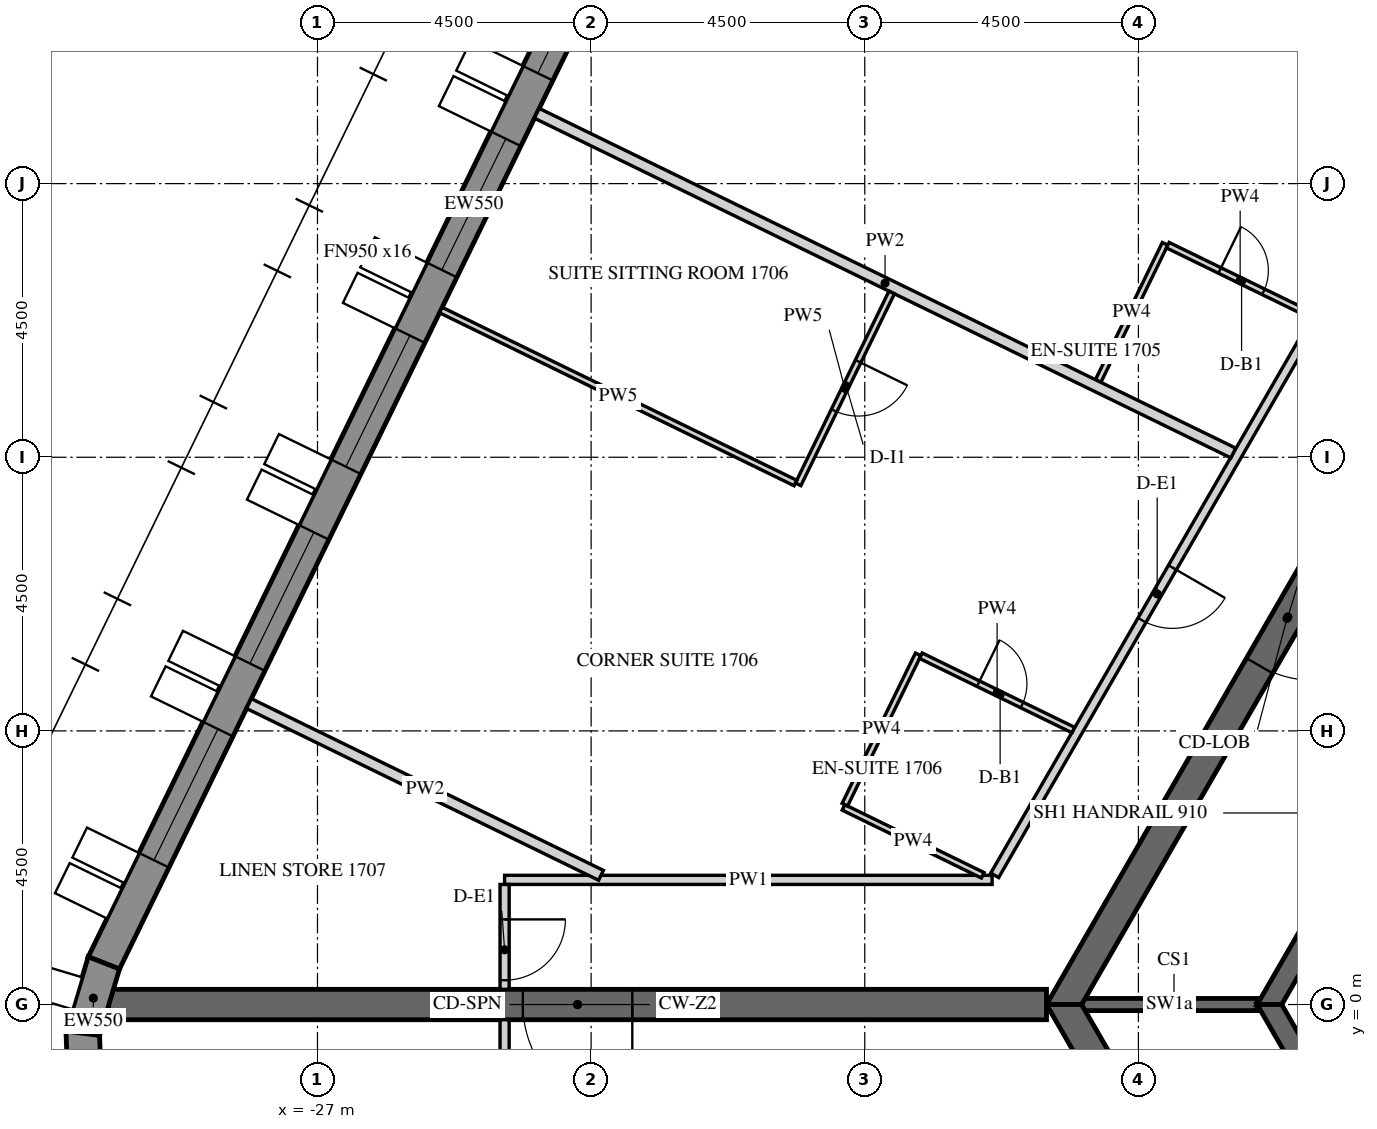
"""IFC4 building model, lengths in metres.
Left out: names, types, materials, properties, quantities, classifications, styles, units other than length and angle.
Written with IfcOpenShell. Run it as: python <this file> out.ifc"""

import sys

from ifc_helpers import new_model, si_unit, direction, frame, frame_2d, origin, place, context, subcontext, project, spatial, polyline, rectangle, outline, extrude, element, fill, save


model = new_model("IFC4")
c1 = context("Model", 3, precision=1e-05, world=origin(), true_north=direction((0.0, 1.0)))
c2 = subcontext(c1, "Body", "Model", "MODEL_VIEW")
j1 = project(units=[si_unit("LENGTHUNIT", "METRE"), si_unit("PLANEANGLEUNIT", "RADIAN")], contexts=[c1])
p1 = place(None, origin())
s1 = spatial("IfcSite", under=j1, at=p1, CompositionType="ELEMENT")
p2 = place(p1, origin())
s2 = spatial("IfcBuilding", under=s1, at=p2, CompositionType="ELEMENT")
p3 = place(p2, frame((0.0, 0.0, 215.1)))
s3 = spatial("IfcBuildingStorey", under=s2, at=p3, CompositionType="ELEMENT", Elevation=215.1)
p4 = place(p3, frame((-18.345, 25.633, -0.15), z_axis=(0.0, 0.0, 1.0), x_axis=(-0.43837181828, -0.898793718791, 0.0)))
e1 = element("IfcWall", 1, at=p4, inside=s3, PredefinedType="SOLIDWALL", context=c2, shape_type="SweptSolid", body=[
    extrude(outline(polyline([(-0.026, -0.275), (27.78, -0.275), (27.735, 0.275), (0.026, 0.275), (-0.026, -0.275)])), origin(), (0.0, 0.0, 1.0), 3.9),
])
p5 = place(p4, frame((1.879, 0.0, 1.05)))
e2 = element("IfcOpeningElement", 2, at=p5, cuts=e1, PredefinedType="OPENING", context=c2, shape_type="SweptSolid", body=[
    extrude(rectangle(XDim=2.4, YDim=2.4, at=frame_2d((1.2, 1.2))), frame((0.0, 0.285, 0.0), z_axis=(0.0, -1.0, 0.0), x_axis=(1.0, 0.0, 0.0)), (0.0, 0.0, 1.0), 0.57),
])
p6 = place(p4, frame((5.479, 0.0, 1.05)))
e3 = element("IfcOpeningElement", 3, at=p6, cuts=e1, PredefinedType="OPENING", context=c2, shape_type="SweptSolid", body=[
    extrude(rectangle(XDim=2.4, YDim=2.4, at=frame_2d((1.2, 1.2))), frame((0.0, 0.285, 0.0), z_axis=(0.0, -1.0, 0.0), x_axis=(1.0, 0.0, 0.0)), (0.0, 0.0, 1.0), 0.57),
])
p7 = place(p4, frame((9.079, 0.0, 1.05)))
e4 = element("IfcOpeningElement", 4, at=p7, cuts=e1, PredefinedType="OPENING", context=c2, shape_type="SweptSolid", body=[
    extrude(rectangle(XDim=2.4, YDim=2.4, at=frame_2d((1.2, 1.2))), frame((0.0, 0.285, 0.0), z_axis=(0.0, -1.0, 0.0), x_axis=(1.0, 0.0, 0.0)), (0.0, 0.0, 1.0), 0.57),
])
p8 = place(p4, frame((12.679, 0.0, 1.05)))
e5 = element("IfcOpeningElement", 5, at=p8, cuts=e1, PredefinedType="OPENING", context=c2, shape_type="SweptSolid", body=[
    extrude(rectangle(XDim=2.4, YDim=2.4, at=frame_2d((1.2, 1.2))), frame((0.0, 0.285, 0.0), z_axis=(0.0, -1.0, 0.0), x_axis=(1.0, 0.0, 0.0)), (0.0, 0.0, 1.0), 0.57),
])
p9 = place(p4, frame((16.279, 0.0, 1.05)))
e6 = element("IfcOpeningElement", 6, at=p9, cuts=e1, PredefinedType="OPENING", context=c2, shape_type="SweptSolid", body=[
    extrude(rectangle(XDim=2.4, YDim=2.4, at=frame_2d((1.2, 1.2))), frame((0.0, 0.285, 0.0), z_axis=(0.0, -1.0, 0.0), x_axis=(1.0, 0.0, 0.0)), (0.0, 0.0, 1.0), 0.57),
])
p10 = place(p4, frame((19.879, 0.0, 1.05)))
e7 = element("IfcOpeningElement", 7, at=p10, cuts=e1, PredefinedType="OPENING", context=c2, shape_type="SweptSolid", body=[
    extrude(rectangle(XDim=2.4, YDim=2.4, at=frame_2d((1.2, 1.2))), frame((0.0, 0.285, 0.0), z_axis=(0.0, -1.0, 0.0), x_axis=(1.0, 0.0, 0.0)), (0.0, 0.0, 1.0), 0.57),
])
p11 = place(p4, frame((23.479, 0.0, 1.05)))
e8 = element("IfcOpeningElement", 8, at=p11, cuts=e1, PredefinedType="OPENING", context=c2, shape_type="SweptSolid", body=[
    extrude(rectangle(XDim=2.4, YDim=2.4, at=frame_2d((1.2, 1.2))), frame((0.0, 0.285, 0.0), z_axis=(0.0, -1.0, 0.0), x_axis=(1.0, 0.0, 0.0)), (0.0, 0.0, 1.0), 0.57),
])
p12 = place(p3, frame((-30.513, 0.684, -0.15), z_axis=(0.0, 0.0, 1.0), x_axis=(-0.286736058109, -0.958009620505, 0.0)))
e9 = element("IfcWall", 9, at=p12, inside=s3, PredefinedType="SOLIDWALL", context=c2, shape_type="SweptSolid", body=[
    extrude(outline(polyline([(-0.022, -0.275), (1.253, -0.275), (1.163, 0.275), (0.022, 0.275), (-0.022, -0.275)])), origin(), (0.0, 0.0, 1.0), 3.9),
])
p13 = place(p3, frame((-30.86, -0.473, -0.15), z_axis=(0.0, 0.0, 1.0), x_axis=(0.03495638276, -0.999388838893, 0.0)))
e10 = element("IfcWall", 10, at=p13, inside=s3, PredefinedType="SOLIDWALL", context=c2, shape_type="SweptSolid", body=[
    extrude(outline(polyline([(-0.045, -0.275), (1.253, -0.275), (1.163, 0.275), (0.045, 0.275), (-0.045, -0.275)])), origin(), (0.0, 0.0, 1.0), 3.9),
])
p14 = place(p3, frame((-7.361, 12.75, -0.15), z_axis=(0.0, 0.0, 1.0), x_axis=(-0.50000571537, -0.866022103989, 0.0)))
e11 = element("IfcWall", 11, at=p14, inside=s3, PredefinedType="SHEAR", context=c2, shape_type="SweptSolid", body=[
    extrude(outline(polyline([(-0.144, -0.25), (14.867, -0.25), (14.578, 0.25), (0.144, 0.25), (-0.144, -0.25)])), origin(), (0.0, 0.0, 1.0), 3.9),
])
p15 = place(p14, frame((6.49, 0.0, 0.15)))
e12 = element("IfcOpeningElement", 12, at=p15, cuts=e11, PredefinedType="OPENING", context=c2, shape_type="SweptSolid", body=[
    extrude(rectangle(XDim=1.8, YDim=2.4, at=frame_2d((0.9, 1.2))), frame((0.0, 0.26, 0.0), z_axis=(0.0, -1.0, 0.0), x_axis=(1.0, 0.0, 0.0)), (0.0, 0.0, 1.0), 0.52),
])
p16 = place(p3, frame((-14.722, 0.0, -0.15), z_axis=(0.0, 0.0, 1.0), x_axis=(0.50000571537, -0.866022103989, 0.0)))
e13 = element("IfcWall", 13, at=p16, inside=s3, PredefinedType="SHEAR", context=c2, shape_type="SweptSolid", body=[
    extrude(outline(polyline([(-0.144, -0.25), (14.867, -0.25), (14.578, 0.25), (0.144, 0.25), (-0.144, -0.25)])), origin(), (0.0, 0.0, 1.0), 3.9),
])
p17 = place(p16, frame((6.432, 0.0, 0.15)))
e14 = element("IfcOpeningElement", 14, at=p17, cuts=e13, PredefinedType="OPENING", context=c2, shape_type="SweptSolid", body=[
    extrude(rectangle(XDim=1.8, YDim=2.4, at=frame_2d((0.9, 1.2))), frame((0.0, 0.26, 0.0), z_axis=(0.0, -1.0, 0.0), x_axis=(1.0, 0.0, 0.0)), (0.0, 0.0, 1.0), 0.52),
])
p18 = place(p3, frame((-15.011, 0.0, -0.15), z_axis=(0.0, 0.0, 1.0), x_axis=(-1.0, 0.0, 0.0)))
e15 = element("IfcWall", 15, at=p18, inside=s3, PredefinedType="SHEAR", context=c2, shape_type="SweptSolid", body=[
    extrude(rectangle(XDim=15.424, YDim=0.5, at=frame_2d((7.712, 0.0))), origin(), (0.0, 0.0, 1.0), 3.9),
])
p19 = place(p18, frame((6.812, 0.0, 0.15)))
e16 = element("IfcOpeningElement", 16, at=p19, cuts=e15, PredefinedType="OPENING", context=c2, shape_type="SweptSolid", body=[
    extrude(rectangle(XDim=1.8, YDim=2.4, at=frame_2d((0.9, 1.2))), frame((0.0, 0.26, 0.0), z_axis=(0.0, -1.0, 0.0), x_axis=(1.0, 0.0, 0.0)), (0.0, 0.0, 1.0), 0.52),
])
p20 = place(p3, frame((-5.673, 9.825, -0.15), z_axis=(0.0, 0.0, 1.0), x_axis=(-0.499995046907, -0.866028263435, 0.0)))
e17 = element("IfcWall", 17, at=p20, inside=s3, PredefinedType="SHEAR", context=c2, shape_type="SweptSolid", body=[
    extrude(outline(polyline([(-0.101, -0.175), (11.446, -0.175), (11.244, 0.175), (0.101, 0.175), (-0.101, -0.175)])), origin(), (0.0, 0.0, 1.0), 3.9),
])
p21 = place(p20, frame((4.801, 0.0, 0.15)))
e18 = element("IfcOpeningElement", 18, at=p21, cuts=e17, PredefinedType="OPENING", context=c2, shape_type="SweptSolid", body=[
    extrude(rectangle(XDim=1.8, YDim=2.4, at=frame_2d((0.9, 1.2))), frame((0.0, 0.185, 0.0), z_axis=(0.0, -1.0, 0.0), x_axis=(1.0, 0.0, 0.0)), (0.0, 0.0, 1.0), 0.37),
])
p22 = place(p3, frame((-11.345, 0.0, -0.15), z_axis=(0.0, 0.0, 1.0), x_axis=(0.499995046907, -0.866028263435, 0.0)))
e19 = element("IfcWall", 19, at=p22, inside=s3, PredefinedType="SHEAR", context=c2, shape_type="SweptSolid", body=[
    extrude(outline(polyline([(-0.101, -0.175), (11.446, -0.175), (11.244, 0.175), (0.101, 0.175), (-0.101, -0.175)])), origin(), (0.0, 0.0, 1.0), 3.9),
])
p23 = place(p22, frame((4.744, 0.0, 0.15)))
e20 = element("IfcOpeningElement", 20, at=p23, cuts=e19, PredefinedType="OPENING", context=c2, shape_type="SweptSolid", body=[
    extrude(rectangle(XDim=1.8, YDim=2.4, at=frame_2d((0.9, 1.2))), frame((0.0, 0.185, 0.0), z_axis=(0.0, -1.0, 0.0), x_axis=(1.0, 0.0, 0.0)), (0.0, 0.0, 1.0), 0.37),
])
p24 = place(p3, frame((-11.547, 0.0, -0.15), z_axis=(0.0, 0.0, 1.0), x_axis=(-1.0, 0.0, 0.0)))
e21 = element("IfcWall", 21, at=p24, inside=s3, PredefinedType="SHEAR", context=c2, shape_type="SweptSolid", body=[
    extrude(rectangle(XDim=2.887, YDim=0.2, at=frame_2d((1.443, 0.0))), origin(), (0.0, 0.0, 1.0), 3.9),
])
p25 = place(p3, frame((-8.588, 14.725, 0.0), z_axis=(0.0, 0.0, 1.0), x_axis=(-0.499999403554, -0.866025748143, 0.0)))
e22 = element("IfcWall", 22, at=p25, inside=s3, PredefinedType="PARTITIONING", context=c2, shape_type="SweptSolid", body=[
    extrude(rectangle(XDim=14.549, YDim=0.15, at=frame_2d((7.275, 0.0))), origin(), (0.0, 0.0, 1.0), 2.988),
])
p26 = place(p25, frame((1.781, 0.0, 0.0)))
e23 = element("IfcOpeningElement", 23, at=p26, cuts=e22, PredefinedType="OPENING", context=c2, shape_type="SweptSolid", body=[
    extrude(rectangle(XDim=1.0, YDim=2.1, at=frame_2d((0.5, 1.05))), frame((0.0, 0.085, 0.0), z_axis=(0.0, -1.0, 0.0), x_axis=(1.0, 0.0, 0.0)), (0.0, 0.0, 1.0), 0.17),
])
p27 = place(p25, frame((8.705, 0.0, 0.0)))
e24 = element("IfcOpeningElement", 24, at=p27, cuts=e22, PredefinedType="OPENING", context=c2, shape_type="SweptSolid", body=[
    extrude(rectangle(XDim=1.0, YDim=2.1, at=frame_2d((0.5, 1.05))), frame((0.0, 0.085, 0.0), z_axis=(0.0, -1.0, 0.0), x_axis=(1.0, 0.0, 0.0)), (0.0, 0.0, 1.0), 0.17),
])
p28 = place(p3, frame((-15.906, 2.05, 0.0), z_axis=(0.0, 0.0, 1.0), x_axis=(-1.0, 0.0, 0.0)))
e25 = element("IfcWall", 25, at=p28, inside=s3, PredefinedType="PARTITIONING", context=c2, shape_type="SweptSolid", body=[
    extrude(rectangle(XDim=8.017, YDim=0.15, at=frame_2d((4.008, 0.0))), origin(), (0.0, 0.0, 1.0), 2.988),
])
p29 = place(p3, frame((-23.923, 1.975, 0.0), z_axis=(0.0, 0.0, 1.0), x_axis=(0.0, -1.0, 0.0)))
e26 = element("IfcWall", 26, at=p29, inside=s3, PredefinedType="PARTITIONING", context=c2, shape_type="SweptSolid", body=[
    extrude(rectangle(XDim=1.725, YDim=0.15, at=frame_2d((0.863, 0.0))), origin(), (0.0, 0.0, 1.0), 2.988),
])
p30 = place(p29, frame((0.575, 0.0, 0.0)))
e27 = element("IfcOpeningElement", 27, at=p30, cuts=e26, PredefinedType="OPENING", context=c2, shape_type="SweptSolid", body=[
    extrude(rectangle(XDim=1.0, YDim=2.1, at=frame_2d((0.5, 1.05))), frame((0.0, 0.085, 0.0), z_axis=(0.0, -1.0, 0.0), x_axis=(1.0, 0.0, 0.0)), (0.0, 0.0, 1.0), 0.17),
])
p31 = place(p3, frame((-23.923, -0.25, 0.0), z_axis=(0.0, 0.0, 1.0), x_axis=(0.0, -1.0, 0.0)))
e28 = element("IfcWall", 28, at=p31, inside=s3, PredefinedType="PARTITIONING", context=c2, shape_type="SweptSolid", body=[
    extrude(rectangle(XDim=1.8, YDim=0.15, at=frame_2d((0.9, 0.0))), origin(), (0.0, 0.0, 1.0), 2.988),
])
p32 = place(p3, frame((-16.791, 26.871, 0.0), z_axis=(0.0, 0.0, 1.0), x_axis=(0.529927950822, -0.848042668111, 0.0)))
e29 = element("IfcWall", 29, at=p32, inside=s3, PredefinedType="PARTITIONING", context=c2, shape_type="SweptSolid", body=[
    extrude(rectangle(XDim=14.839, YDim=0.18, at=frame_2d((7.419, 0.0))), origin(), (0.0, 0.0, 1.0), 2.988),
])
p33 = place(p3, frame((-14.162, 10.254, 0.0), z_axis=(0.0, 0.0, 1.0), x_axis=(0.438398718232, 0.898780598284, 0.0)))
e30 = element("IfcWall", 30, at=p33, inside=s3, PredefinedType="PARTITIONING", context=c2, shape_type="SweptSolid", body=[
    extrude(rectangle(XDim=2.51, YDim=0.1, at=frame_2d((1.255, 0.0))), origin(), (0.0, 0.0, 1.0), 2.988),
])
p34 = place(p3, frame((-13.017, 12.488, 0.0), z_axis=(0.0, 0.0, 1.0), x_axis=(0.89882691906, -0.438303741226, 0.0)))
e31 = element("IfcWall", 31, at=p34, inside=s3, PredefinedType="PARTITIONING", context=c2, shape_type="SweptSolid", body=[
    extrude(rectangle(XDim=2.648, YDim=0.1, at=frame_2d((1.324, 0.0))), origin(), (0.0, 0.0, 1.0), 2.988),
])
p35 = place(p34, frame((0.95, 0.0, 0.0)))
e32 = element("IfcOpeningElement", 32, at=p35, cuts=e31, PredefinedType="OPENING", context=c2, shape_type="SweptSolid", body=[
    extrude(rectangle(XDim=0.8, YDim=2.1, at=frame_2d((0.4, 1.05))), frame((0.0, 0.06, 0.0), z_axis=(0.0, -1.0, 0.0), x_axis=(1.0, 0.0, 0.0)), (0.0, 0.0, 1.0), 0.12),
])
p36 = place(p3, frame((-23.393, 14.656, 0.0), z_axis=(0.0, 0.0, 1.0), x_axis=(0.898790356386, -0.438378712152, 0.0)))
e33 = element("IfcWall", 33, at=p36, inside=s3, PredefinedType="PARTITIONING", context=c2, shape_type="SweptSolid", body=[
    extrude(rectangle(XDim=12.743, YDim=0.18, at=frame_2d((6.372, 0.0))), origin(), (0.0, 0.0, 1.0), 2.988),
])
p37 = place(p3, frame((-16.06, 2.125, 0.0), z_axis=(0.0, 0.0, 1.0), x_axis=(-0.898792392919, 0.438374536704, 0.0)))
e34 = element("IfcWall", 34, at=p37, inside=s3, PredefinedType="PARTITIONING", context=c2, shape_type="SweptSolid", body=[
    extrude(rectangle(XDim=2.547, YDim=0.1, at=frame_2d((1.274, 0.0))), origin(), (0.0, 0.0, 1.0), 2.988),
])
p38 = place(p3, frame((-18.328, 3.287, 0.0), z_axis=(0.0, 0.0, 1.0), x_axis=(0.438385151252, 0.898787215731, 0.0)))
e35 = element("IfcWall", 35, at=p38, inside=s3, PredefinedType="PARTITIONING", context=c2, shape_type="SweptSolid", body=[
    extrude(rectangle(XDim=2.75, YDim=0.1, at=frame_2d((1.375, 0.0))), origin(), (0.0, 0.0, 1.0), 2.988),
])
p39 = place(p3, frame((-17.077, 5.737, 0.0), z_axis=(0.0, 0.0, 1.0), x_axis=(0.898777698277, -0.438404663616, 0.0)))
e36 = element("IfcWall", 36, at=p39, inside=s3, PredefinedType="PARTITIONING", context=c2, shape_type="SweptSolid", body=[
    extrude(rectangle(XDim=2.79, YDim=0.1, at=frame_2d((1.395, 0.0))), origin(), (0.0, 0.0, 1.0), 2.988),
])
p40 = place(p39, frame((1.05, 0.0, 0.0)))
e37 = element("IfcOpeningElement", 37, at=p40, cuts=e36, PredefinedType="OPENING", context=c2, shape_type="SweptSolid", body=[
    extrude(rectangle(XDim=0.8, YDim=2.1, at=frame_2d((0.4, 1.05))), frame((0.0, 0.06, 0.0), z_axis=(0.0, -1.0, 0.0), x_axis=(1.0, 0.0, 0.0)), (0.0, 0.0, 1.0), 0.12),
])
p41 = place(p3, frame((-17.557, 11.71, 0.0), z_axis=(0.0, 0.0, 1.0), x_axis=(-0.438400335718, -0.898779809321, 0.0)))
e38 = element("IfcWall", 38, at=p41, inside=s3, PredefinedType="PARTITIONING", context=c2, shape_type="SweptSolid", body=[
    extrude(rectangle(XDim=3.51, YDim=0.1, at=frame_2d((1.755, 0.0))), origin(), (0.0, 0.0, 1.0), 2.988),
])
p42 = place(p41, frame((1.26, 0.0, 0.0)))
e39 = element("IfcOpeningElement", 39, at=p42, cuts=e38, PredefinedType="OPENING", context=c2, shape_type="SweptSolid", body=[
    extrude(rectangle(XDim=0.9, YDim=2.1, at=frame_2d((0.45, 1.05))), frame((0.0, 0.06, 0.0), z_axis=(0.0, -1.0, 0.0), x_axis=(1.0, 0.0, 0.0)), (0.0, 0.0, 1.0), 0.12),
])
p43 = place(p3, frame((-19.141, 8.577, 0.0), z_axis=(0.0, 0.0, 1.0), x_axis=(-0.898794850282, 0.438369498377, 0.0)))
e40 = element("IfcWall", 40, at=p43, inside=s3, PredefinedType="PARTITIONING", context=c2, shape_type="SweptSolid", body=[
    extrude(rectangle(XDim=6.487, YDim=0.1, at=frame_2d((3.243, 0.0))), origin(), (0.0, 0.0, 1.0), 2.988),
])
p44 = place(p3, frame((-28.127, 4.949, 0.0), z_axis=(0.0, 0.0, 1.0), x_axis=(0.898795032868, -0.438369124017, 0.0)))
e41 = element("IfcWall", 41, at=p44, inside=s3, PredefinedType="PARTITIONING", context=c2, shape_type="SweptSolid", body=[
    extrude(rectangle(XDim=6.442, YDim=0.18, at=frame_2d((3.221, 0.0))), origin(), (0.0, 0.0, 1.0), 2.988),
])
p45 = place(p7, frame((0.0, 0.205, 0.0)))
e42 = element("IfcWindow", 42, at=p45, inside=s3, PartitioningType="DOUBLE_PANEL_VERTICAL", PredefinedType="WINDOW", context=c2, shape_type="SweptSolid", body=[
    extrude(rectangle(XDim=2.4, YDim=2.4, at=frame_2d((1.2, 1.2))), frame((0.0, 0.03, 0.0), z_axis=(0.0, -1.0, 0.0), x_axis=(1.0, 0.0, 0.0)), (0.0, 0.0, 1.0), 0.06),
])
fill(e4, e42)
p46 = place(p8, frame((0.0, 0.205, 0.0)))
e43 = element("IfcWindow", 43, at=p46, inside=s3, PartitioningType="DOUBLE_PANEL_VERTICAL", PredefinedType="WINDOW", context=c2, shape_type="SweptSolid", body=[
    extrude(rectangle(XDim=2.4, YDim=2.4, at=frame_2d((1.2, 1.2))), frame((0.0, 0.03, 0.0), z_axis=(0.0, -1.0, 0.0), x_axis=(1.0, 0.0, 0.0)), (0.0, 0.0, 1.0), 0.06),
])
fill(e5, e43)
p47 = place(p9, frame((0.0, 0.205, 0.0)))
e44 = element("IfcWindow", 44, at=p47, inside=s3, PartitioningType="DOUBLE_PANEL_VERTICAL", PredefinedType="WINDOW", context=c2, shape_type="SweptSolid", body=[
    extrude(rectangle(XDim=2.4, YDim=2.4, at=frame_2d((1.2, 1.2))), frame((0.0, 0.03, 0.0), z_axis=(0.0, -1.0, 0.0), x_axis=(1.0, 0.0, 0.0)), (0.0, 0.0, 1.0), 0.06),
])
fill(e6, e44)
p48 = place(p10, frame((0.0, 0.205, 0.0)))
e45 = element("IfcWindow", 45, at=p48, inside=s3, PartitioningType="DOUBLE_PANEL_VERTICAL", PredefinedType="WINDOW", context=c2, shape_type="SweptSolid", body=[
    extrude(rectangle(XDim=2.4, YDim=2.4, at=frame_2d((1.2, 1.2))), frame((0.0, 0.03, 0.0), z_axis=(0.0, -1.0, 0.0), x_axis=(1.0, 0.0, 0.0)), (0.0, 0.0, 1.0), 0.06),
])
fill(e7, e45)
p49 = place(p11, frame((0.0, 0.205, 0.0)))
e46 = element("IfcWindow", 46, at=p49, inside=s3, PartitioningType="DOUBLE_PANEL_VERTICAL", PredefinedType="WINDOW", context=c2, shape_type="SweptSolid", body=[
    extrude(rectangle(XDim=2.4, YDim=2.4, at=frame_2d((1.2, 1.2))), frame((0.0, 0.03, 0.0), z_axis=(0.0, -1.0, 0.0), x_axis=(1.0, 0.0, 0.0)), (0.0, 0.0, 1.0), 0.06),
])
fill(e8, e46)
p50 = place(p15, origin())
e47 = element("IfcDoor", 47, at=p50, inside=s3, OperationType="DOUBLE_DOOR_SINGLE_SWING", PredefinedType="DOOR", context=c2, shape_type="SweptSolid", body=[
    extrude(rectangle(XDim=1.8, YDim=2.4, at=frame_2d((0.9, 1.2))), frame((0.0, 0.025, 0.0), z_axis=(0.0, -1.0, 0.0), x_axis=(1.0, 0.0, 0.0)), (0.0, 0.0, 1.0), 0.05),
])
fill(e12, e47)
p51 = place(p19, origin())
e48 = element("IfcDoor", 48, at=p51, inside=s3, OperationType="DOUBLE_DOOR_SINGLE_SWING", PredefinedType="DOOR", context=c2, shape_type="SweptSolid", body=[
    extrude(rectangle(XDim=1.8, YDim=2.4, at=frame_2d((0.9, 1.2))), frame((0.0, 0.025, 0.0), z_axis=(0.0, -1.0, 0.0), x_axis=(1.0, 0.0, 0.0)), (0.0, 0.0, 1.0), 0.05),
])
fill(e16, e48)
p52 = place(p35, origin())
e49 = element("IfcDoor", 49, at=p52, inside=s3, OperationType="SINGLE_SWING_LEFT", PredefinedType="DOOR", context=c2, shape_type="SweptSolid", body=[
    extrude(rectangle(XDim=0.8, YDim=2.1, at=frame_2d((0.4, 1.05))), frame((0.0, 0.025, 0.0), z_axis=(0.0, -1.0, 0.0), x_axis=(1.0, 0.0, 0.0)), (0.0, 0.0, 1.0), 0.05),
])
fill(e32, e49)
p53 = place(p27, origin())
e50 = element("IfcDoor", 50, at=p53, inside=s3, OperationType="SINGLE_SWING_RIGHT", PredefinedType="DOOR", context=c2, shape_type="SweptSolid", body=[
    extrude(rectangle(XDim=1.0, YDim=2.1, at=frame_2d((0.5, 1.05))), frame((0.0, 0.025, 0.0), z_axis=(0.0, -1.0, 0.0), x_axis=(1.0, 0.0, 0.0)), (0.0, 0.0, 1.0), 0.05),
])
fill(e24, e50)
p54 = place(p40, origin())
e51 = element("IfcDoor", 51, at=p54, inside=s3, OperationType="SINGLE_SWING_LEFT", PredefinedType="DOOR", context=c2, shape_type="SweptSolid", body=[
    extrude(rectangle(XDim=0.8, YDim=2.1, at=frame_2d((0.4, 1.05))), frame((0.0, 0.025, 0.0), z_axis=(0.0, -1.0, 0.0), x_axis=(1.0, 0.0, 0.0)), (0.0, 0.0, 1.0), 0.05),
])
fill(e37, e51)
p55 = place(p42, origin())
e52 = element("IfcDoor", 52, at=p55, inside=s3, OperationType="SINGLE_SWING_RIGHT", PredefinedType="DOOR", context=c2, shape_type="SweptSolid", body=[
    extrude(rectangle(XDim=0.9, YDim=2.1, at=frame_2d((0.45, 1.05))), frame((0.0, 0.025, 0.0), z_axis=(0.0, -1.0, 0.0), x_axis=(1.0, 0.0, 0.0)), (0.0, 0.0, 1.0), 0.05),
])
fill(e39, e52)
p56 = place(p30, origin())
e53 = element("IfcDoor", 53, at=p56, inside=s3, OperationType="SINGLE_SWING_LEFT", PredefinedType="DOOR", context=c2, shape_type="SweptSolid", body=[
    extrude(rectangle(XDim=1.0, YDim=2.1, at=frame_2d((0.5, 1.05))), frame((0.0, 0.025, 0.0), z_axis=(0.0, -1.0, 0.0), x_axis=(1.0, 0.0, 0.0)), (0.0, 0.0, 1.0), 0.05),
])
fill(e27, e53)
save(model, sys.argv[1])
